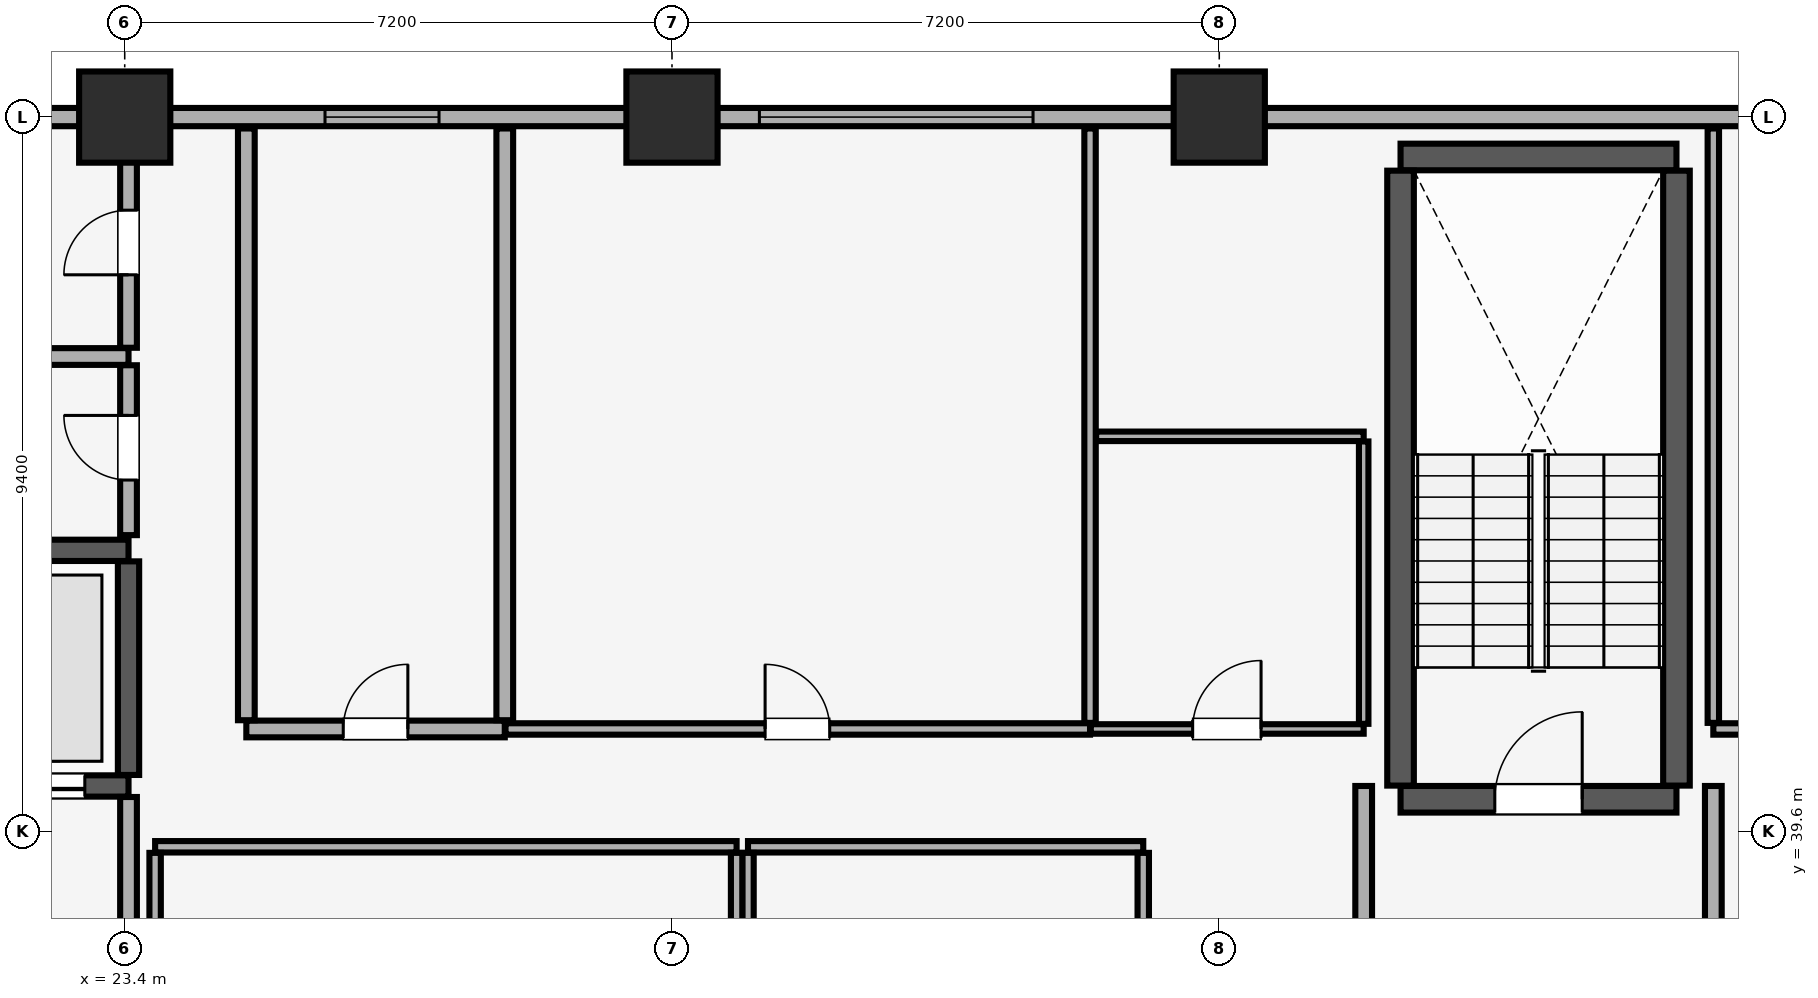
"""IFC4 building model, lengths in metres.
Left out: names, types, materials, properties, quantities, classifications, styles, units other than length and angle.
Written with IfcOpenShell. Run it as: python <this file> out.ifc"""

import sys

from ifc_helpers import new_model, si_unit, direction, frame, frame_2d, origin, origin_2d, place, context, subcontext, project, spatial, rectangle, extrude, element, fill, save


model = new_model("IFC4")
c1 = context("Model", 3, precision=1e-05, world=origin(), true_north=direction((0.0, 1.0)))
c2 = subcontext(c1, "Body", "Model", "MODEL_VIEW")
j1 = project(units=[si_unit("LENGTHUNIT", "METRE"), si_unit("PLANEANGLEUNIT", "RADIAN")], contexts=[c1])
p1 = place(None, origin())
s1 = spatial("IfcSite", under=j1, at=p1, CompositionType="ELEMENT")
p2 = place(p1, origin())
s2 = spatial("IfcBuilding", under=s1, at=p2, CompositionType="ELEMENT")
p3 = place(p2, frame((0.0, 0.0, 180.95)))
s3 = spatial("IfcBuildingStorey", under=s2, at=p3, CompositionType="ELEMENT", Elevation=180.95)
for number, where, z_axis, x_axis in (
    (1, (23.4, 49.0, 0.0), (0.0, 0.0, 1.0), (1.0, 0.0, 0.0)),
    (2, (30.6, 49.0, 0.0), (0.0, 0.0, 1.0), (1.0, 0.0, 0.0)),
    (3, (37.8, 49.0, 0.0), (0.0, 0.0, 1.0), (1.0, 0.0, 0.0)),
):
    element("IfcColumn", number, at=place(p3, frame(where, z_axis=z_axis, x_axis=x_axis)), inside=s3, PredefinedType="COLUMN", context=c2, shape_type="SweptSolid", body=[
        extrude(rectangle(XDim=1.2, YDim=1.2, at=origin_2d()), origin(), (0.0, 0.0, 1.0), 3.45),
    ])
p4 = place(p3, frame((77.0, 49.0, 0.0), z_axis=(0.0, 0.0, 1.0), x_axis=(-1.0, 0.0, 0.0)))
e4 = element("IfcWall", 4, at=p4, inside=s3, PredefinedType="SOLIDWALL", context=c2, shape_type="SweptSolid", body=[
    extrude(rectangle(XDim=70.0, YDim=0.24, at=frame_2d((35.0, 0.0))), origin(), (0.0, 0.0, 1.0), 2.65),
])
p5 = place(p4, frame((63.7, 0.0, 0.85)))
e5 = element("IfcOpeningElement", 5, at=p5, cuts=e4, PredefinedType="OPENING", context=c2, shape_type="SweptSolid", body=[
    extrude(rectangle(XDim=3.0, YDim=1.5, at=frame_2d((1.5, 0.75))), frame((0.0, 0.13, 0.0), z_axis=(0.0, -1.0, 0.0), x_axis=(1.0, 0.0, 0.0)), (0.0, 0.0, 1.0), 0.26),
])
p6 = place(p4, frame((3.3, 0.0, 0.85)))
e6 = element("IfcOpeningElement", 6, at=p6, cuts=e4, PredefinedType="OPENING", context=c2, shape_type="SweptSolid", body=[
    extrude(rectangle(XDim=3.0, YDim=1.5, at=frame_2d((1.5, 0.75))), frame((0.0, 0.13, 0.0), z_axis=(0.0, -1.0, 0.0), x_axis=(1.0, 0.0, 0.0)), (0.0, 0.0, 1.0), 0.26),
])
p7 = place(p4, frame((49.465, 0.0, 0.9)))
e7 = element("IfcOpeningElement", 7, at=p7, cuts=e4, PredefinedType="OPENING", context=c2, shape_type="SweptSolid", body=[
    extrude(rectangle(XDim=1.5, YDim=1.4, at=frame_2d((0.75, 0.7))), frame((0.0, 0.13, 0.0), z_axis=(0.0, -1.0, 0.0), x_axis=(1.0, 0.0, 0.0)), (0.0, 0.0, 1.0), 0.26),
])
p8 = place(p4, frame((41.65, 0.0, 0.9)))
e8 = element("IfcOpeningElement", 8, at=p8, cuts=e4, PredefinedType="OPENING", context=c2, shape_type="SweptSolid", body=[
    extrude(rectangle(XDim=3.6, YDim=1.5, at=frame_2d((1.8, 0.75))), frame((0.0, 0.13, 0.0), z_axis=(0.0, -1.0, 0.0), x_axis=(1.0, 0.0, 0.0)), (0.0, 0.0, 1.0), 0.26),
])
p9 = place(p4, frame((28.25, 0.0, 0.9)))
e9 = element("IfcOpeningElement", 9, at=p9, cuts=e4, PredefinedType="OPENING", context=c2, shape_type="SweptSolid", body=[
    extrude(rectangle(XDim=1.5, YDim=1.4, at=frame_2d((0.75, 0.7))), frame((0.0, 0.13, 0.0), z_axis=(0.0, -1.0, 0.0), x_axis=(1.0, 0.0, 0.0)), (0.0, 0.0, 1.0), 0.26),
])
p10 = place(p4, frame((24.6, 0.0, 0.9)))
e10 = element("IfcOpeningElement", 10, at=p10, cuts=e4, PredefinedType="OPENING", context=c2, shape_type="SweptSolid", body=[
    extrude(rectangle(XDim=2.4, YDim=1.5, at=frame_2d((1.2, 0.75))), frame((0.0, 0.13, 0.0), z_axis=(0.0, -1.0, 0.0), x_axis=(1.0, 0.0, 0.0)), (0.0, 0.0, 1.0), 0.26),
])
p11 = place(p4, frame((20.235, 0.0, 0.9)))
e11 = element("IfcOpeningElement", 11, at=p11, cuts=e4, PredefinedType="OPENING", context=c2, shape_type="SweptSolid", body=[
    extrude(rectangle(XDim=2.4, YDim=1.5, at=frame_2d((1.2, 0.75))), frame((0.0, 0.13, 0.0), z_axis=(0.0, -1.0, 0.0), x_axis=(1.0, 0.0, 0.0)), (0.0, 0.0, 1.0), 0.26),
])
p12 = place(p3, frame((40.185, 40.025, 0.0), z_axis=(0.0, 0.0, 1.0), x_axis=(1.0, 0.0, 0.0)))
e12 = element("IfcWall", 12, at=p12, inside=s3, PredefinedType="SHEAR", context=c2, shape_type="SweptSolid", body=[
    extrude(rectangle(XDim=3.63, YDim=0.35, at=frame_2d((1.815, 0.0))), origin(), (0.0, 0.0, 1.0), 3.45),
])
p13 = place(p12, frame((1.24, 0.0, 0.0)))
e13 = element("IfcOpeningElement", 13, at=p13, cuts=e12, PredefinedType="OPENING", context=c2, shape_type="SweptSolid", body=[
    extrude(rectangle(XDim=1.15, YDim=2.15, at=frame_2d((0.575, 1.075))), frame((0.0, 0.185, 0.0), z_axis=(0.0, -1.0, 0.0), x_axis=(1.0, 0.0, 0.0)), (0.0, 0.0, 1.0), 0.37),
])
p14 = place(p3, frame((40.185, 48.475, 0.0), z_axis=(0.0, 0.0, 1.0), x_axis=(1.0, 0.0, 0.0)))
e14 = element("IfcWall", 14, at=p14, inside=s3, PredefinedType="SHEAR", context=c2, shape_type="SweptSolid", body=[
    extrude(rectangle(XDim=3.63, YDim=0.35, at=frame_2d((1.815, 0.0))), origin(), (0.0, 0.0, 1.0), 3.45),
])
for number, where, z_axis, x_axis in (
    (15, (40.185, 40.205, 0.0), (0.0, 0.0, 1.0), (0.0, 1.0, 0.0)),
    (16, (43.815, 40.205, 0.0), (0.0, 0.0, 1.0), (0.0, 1.0, 0.0)),
):
    element("IfcWall", number, at=place(p3, frame(where, z_axis=z_axis, x_axis=x_axis)), inside=s3, PredefinedType="SHEAR", context=c2, shape_type="SweptSolid", body=[
        extrude(rectangle(XDim=8.09, YDim=0.35, at=frame_2d((4.045, 0.0))), origin(), (0.0, 0.0, 1.0), 3.45),
    ])
p15 = place(p3, frame((21.035, 40.2, 0.0), z_axis=(0.0, 0.0, 1.0), x_axis=(1.0, 0.0, 0.0)))
e17 = element("IfcWall", 17, at=p15, inside=s3, PredefinedType="SHEAR", context=c2, shape_type="SweptSolid", body=[
    extrude(rectangle(XDim=2.415, YDim=0.28, at=frame_2d((1.208, 0.0))), origin(), (0.0, 0.0, 1.0), 3.45),
])
p16 = place(p15, frame((0.54, 0.0, 0.0)))
e18 = element("IfcOpeningElement", 18, at=p16, cuts=e17, PredefinedType="OPENING", context=c2, shape_type="SweptSolid", body=[
    extrude(rectangle(XDim=1.3, YDim=2.3, at=frame_2d((0.65, 1.15))), frame((0.0, 0.15, 0.0), z_axis=(0.0, -1.0, 0.0), x_axis=(1.0, 0.0, 0.0)), (0.0, 0.0, 1.0), 0.3),
])
p17 = place(p3, frame((21.035, 43.3, 0.0), z_axis=(0.0, 0.0, 1.0), x_axis=(1.0, 0.0, 0.0)))
e19 = element("IfcWall", 19, at=p17, inside=s3, PredefinedType="SHEAR", context=c2, shape_type="SweptSolid", body=[
    extrude(rectangle(XDim=2.415, YDim=0.28, at=frame_2d((1.208, 0.0))), origin(), (0.0, 0.0, 1.0), 3.45),
])
p18 = place(p3, frame((23.45, 40.345, 0.0), z_axis=(0.0, 0.0, 1.0), x_axis=(0.0, 1.0, 0.0)))
e20 = element("IfcWall", 20, at=p18, inside=s3, PredefinedType="SHEAR", context=c2, shape_type="SweptSolid", body=[
    extrude(rectangle(XDim=2.81, YDim=0.28, at=frame_2d((1.405, 0.0))), origin(), (0.0, 0.0, 1.0), 3.45),
])
p19 = place(p3, frame((23.45, 34.415, 0.0), z_axis=(0.0, 0.0, 1.0), x_axis=(0.0, 1.0, 0.0)))
e21 = element("IfcWall", 21, at=p19, inside=s3, PredefinedType="PARTITIONING", context=c2, shape_type="SweptSolid", body=[
    extrude(rectangle(XDim=5.64, YDim=0.22, at=frame_2d((2.82, 0.0))), origin(), (0.0, 0.0, 1.0), 3.45),
])
for number, where, z_axis, x_axis in (
    (22, (39.7, 34.415, 0.0), (0.0, 0.0, 1.0), (0.0, 1.0, 0.0)),
    (23, (44.3, 34.415, 0.0), (0.0, 0.0, 1.0), (0.0, 1.0, 0.0)),
):
    element("IfcWall", number, at=place(p3, frame(where, z_axis=z_axis, x_axis=x_axis)), inside=s3, PredefinedType="PARTITIONING", context=c2, shape_type="SweptSolid", body=[
        extrude(rectangle(XDim=5.785, YDim=0.22, at=frame_2d((2.893, 0.0))), origin(), (0.0, 0.0, 1.0), 3.45),
    ])
p20 = place(p3, frame((21.035, 45.85, 0.0), z_axis=(0.0, 0.0, 1.0), x_axis=(1.0, 0.0, 0.0)))
e24 = element("IfcWall", 24, at=p20, inside=s3, PredefinedType="PARTITIONING", context=c2, shape_type="SweptSolid", body=[
    extrude(rectangle(XDim=2.415, YDim=0.22, at=frame_2d((1.208, 0.0))), origin(), (0.0, 0.0, 1.0), 3.45),
])
p21 = place(p3, frame((23.45, 43.5, 0.0), z_axis=(0.0, 0.0, 1.0), x_axis=(0.0, 1.0, 0.0)))
e25 = element("IfcWall", 25, at=p21, inside=s3, PredefinedType="PARTITIONING", context=c2, shape_type="SweptSolid", body=[
    extrude(rectangle(XDim=2.235, YDim=0.22, at=frame_2d((1.118, 0.0))), origin(), (0.0, 0.0, 1.0), 3.45),
])
p22 = place(p21, frame((0.725, 0.0, 0.0)))
e26 = element("IfcOpeningElement", 26, at=p22, cuts=e25, PredefinedType="OPENING", context=c2, shape_type="SweptSolid", body=[
    extrude(rectangle(XDim=0.85, YDim=2.1, at=frame_2d((0.425, 1.05))), frame((0.0, 0.12, 0.0), z_axis=(0.0, -1.0, 0.0), x_axis=(1.0, 0.0, 0.0)), (0.0, 0.0, 1.0), 0.24),
])
p23 = place(p3, frame((23.45, 45.965, 0.0), z_axis=(0.0, 0.0, 1.0), x_axis=(0.0, 1.0, 0.0)))
e27 = element("IfcWall", 27, at=p23, inside=s3, PredefinedType="PARTITIONING", context=c2, shape_type="SweptSolid", body=[
    extrude(rectangle(XDim=2.885, YDim=0.22, at=frame_2d((1.442, 0.0))), origin(), (0.0, 0.0, 1.0), 3.45),
])
p24 = place(p23, frame((0.96, 0.0, 0.0)))
e28 = element("IfcOpeningElement", 28, at=p24, cuts=e27, PredefinedType="OPENING", context=c2, shape_type="SweptSolid", body=[
    extrude(rectangle(XDim=0.85, YDim=2.1, at=frame_2d((0.425, 1.05))), frame((0.0, 0.12, 0.0), z_axis=(0.0, -1.0, 0.0), x_axis=(1.0, 0.0, 0.0)), (0.0, 0.0, 1.0), 0.24),
])
p25 = place(p3, frame((31.6, 39.4, 0.0), z_axis=(0.0, 0.0, 1.0), x_axis=(1.0, 0.0, 0.0)))
e29 = element("IfcWall", 29, at=p25, inside=s3, PredefinedType="PARTITIONING", context=c2, shape_type="SweptSolid", body=[
    extrude(rectangle(XDim=5.2, YDim=0.15, at=frame_2d((2.6, 0.0))), origin(), (0.0, 0.0, 1.0), 3.45),
])
for number, where, z_axis, x_axis in (
    (30, (31.6, 34.38, 0.0), (0.0, 0.0, 1.0), (0.0, 1.0, 0.0)),
    (31, (36.8, 34.38, 0.0), (0.0, 0.0, 1.0), (0.0, 1.0, 0.0)),
):
    element("IfcWall", number, at=place(p3, frame(where, z_axis=z_axis, x_axis=x_axis)), inside=s3, PredefinedType="PARTITIONING", context=c2, shape_type="SweptSolid", body=[
        extrude(rectangle(XDim=4.94, YDim=0.15, at=frame_2d((2.47, 0.0))), origin(), (0.0, 0.0, 1.0), 3.45),
    ])
p26 = place(p3, frame((23.8, 39.4, 0.0), z_axis=(0.0, 0.0, 1.0), x_axis=(1.0, 0.0, 0.0)))
e32 = element("IfcWall", 32, at=p26, inside=s3, PredefinedType="PARTITIONING", context=c2, shape_type="SweptSolid", body=[
    extrude(rectangle(XDim=7.65, YDim=0.15, at=frame_2d((3.825, 0.0))), origin(), (0.0, 0.0, 1.0), 3.45),
])
for number, where, z_axis, x_axis in (
    (33, (23.8, 34.38, 0.0), (0.0, 0.0, 1.0), (0.0, 1.0, 0.0)),
    (34, (31.45, 34.38, 0.0), (0.0, 0.0, 1.0), (0.0, 1.0, 0.0)),
):
    element("IfcWall", number, at=place(p3, frame(where, z_axis=z_axis, x_axis=x_axis)), inside=s3, PredefinedType="PARTITIONING", context=c2, shape_type="SweptSolid", body=[
        extrude(rectangle(XDim=4.94, YDim=0.15, at=frame_2d((2.47, 0.0))), origin(), (0.0, 0.0, 1.0), 3.45),
    ])
p27 = place(p3, frame((25.0, 40.95, 0.0), z_axis=(0.0, 0.0, 1.0), x_axis=(1.0, 0.0, 0.0)))
e35 = element("IfcWall", 35, at=p27, inside=s3, PredefinedType="PARTITIONING", context=c2, shape_type="SweptSolid", body=[
    extrude(rectangle(XDim=3.4, YDim=0.22, at=frame_2d((1.7, 0.0))), origin(), (0.0, 0.0, 1.0), 3.45),
])
p28 = place(p27, frame((1.275, 0.0, 0.0)))
e36 = element("IfcOpeningElement", 36, at=p28, cuts=e35, PredefinedType="OPENING", context=c2, shape_type="SweptSolid", body=[
    extrude(rectangle(XDim=0.85, YDim=2.1, at=frame_2d((0.425, 1.05))), frame((0.0, 0.12, 0.0), z_axis=(0.0, -1.0, 0.0), x_axis=(1.0, 0.0, 0.0)), (0.0, 0.0, 1.0), 0.24),
])
for number, where, z_axis, x_axis in (
    (37, (25.0, 41.065, 0.0), (0.0, 0.0, 1.0), (0.0, 1.0, 0.0)),
    (38, (28.4, 41.065, 0.0), (0.0, 0.0, 1.0), (0.0, 1.0, 0.0)),
):
    element("IfcWall", number, at=place(p3, frame(where, z_axis=z_axis, x_axis=x_axis)), inside=s3, PredefinedType="PARTITIONING", context=c2, shape_type="SweptSolid", body=[
        extrude(rectangle(XDim=7.785, YDim=0.22, at=frame_2d((3.893, 0.0))), origin(), (0.0, 0.0, 1.0), 3.45),
    ])
p29 = place(p3, frame((28.41, 40.95, 0.0), z_axis=(0.0, 0.0, 1.0), x_axis=(1.0, 0.0, 0.0)))
e39 = element("IfcWall", 39, at=p29, inside=s3, PredefinedType="PARTITIONING", context=c2, shape_type="SweptSolid", body=[
    extrude(rectangle(XDim=7.69, YDim=0.15, at=frame_2d((3.845, 0.0))), origin(), (0.0, 0.0, 1.0), 3.45),
])
p30 = place(p29, frame((3.415, 0.0, 0.0)))
e40 = element("IfcOpeningElement", 40, at=p30, cuts=e39, PredefinedType="OPENING", context=c2, shape_type="SweptSolid", body=[
    extrude(rectangle(XDim=0.85, YDim=2.1, at=frame_2d((0.425, 1.05))), frame((0.0, 0.085, 0.0), z_axis=(0.0, -1.0, 0.0), x_axis=(1.0, 0.0, 0.0)), (0.0, 0.0, 1.0), 0.17),
])
p31 = place(p3, frame((36.1, 41.03, 0.0), z_axis=(0.0, 0.0, 1.0), x_axis=(0.0, 1.0, 0.0)))
e41 = element("IfcWall", 41, at=p31, inside=s3, PredefinedType="PARTITIONING", context=c2, shape_type="SweptSolid", body=[
    extrude(rectangle(XDim=7.82, YDim=0.15, at=frame_2d((3.91, 0.0))), origin(), (0.0, 0.0, 1.0), 3.45),
])
p32 = place(p3, frame((36.11, 40.95, 0.0), z_axis=(0.0, 0.0, 1.0), x_axis=(1.0, 0.0, 0.0)))
e42 = element("IfcWall", 42, at=p32, inside=s3, PredefinedType="PARTITIONING", context=c2, shape_type="SweptSolid", body=[
    extrude(rectangle(XDim=3.59, YDim=0.125, at=frame_2d((1.795, 0.0))), origin(), (0.0, 0.0, 1.0), 3.45),
])
p33 = place(p32, frame((1.34, 0.0, 0.0)))
e43 = element("IfcOpeningElement", 43, at=p33, cuts=e42, PredefinedType="OPENING", context=c2, shape_type="SweptSolid", body=[
    extrude(rectangle(XDim=0.9, YDim=2.1, at=frame_2d((0.45, 1.05))), frame((0.0, 0.073, 0.0), z_axis=(0.0, -1.0, 0.0), x_axis=(1.0, 0.0, 0.0)), (0.0, 0.0, 1.0), 0.145),
])
p34 = place(p3, frame((36.18, 44.8, 0.0), z_axis=(0.0, 0.0, 1.0), x_axis=(1.0, 0.0, 0.0)))
e44 = element("IfcWall", 44, at=p34, inside=s3, PredefinedType="PARTITIONING", context=c2, shape_type="SweptSolid", body=[
    extrude(rectangle(XDim=3.52, YDim=0.125, at=frame_2d((1.76, 0.0))), origin(), (0.0, 0.0, 1.0), 3.45),
])
p35 = place(p3, frame((39.7, 41.018, 0.0), z_axis=(0.0, 0.0, 1.0), x_axis=(0.0, 1.0, 0.0)))
e45 = element("IfcWall", 45, at=p35, inside=s3, PredefinedType="PARTITIONING", context=c2, shape_type="SweptSolid", body=[
    extrude(rectangle(XDim=3.715, YDim=0.125, at=frame_2d((1.857, 0.0))), origin(), (0.0, 0.0, 1.0), 3.45),
])
p36 = place(p3, frame((44.3, 40.95, 0.0), z_axis=(0.0, 0.0, 1.0), x_axis=(1.0, 0.0, 0.0)))
e46 = element("IfcWall", 46, at=p36, inside=s3, PredefinedType="PARTITIONING", context=c2, shape_type="SweptSolid", body=[
    extrude(rectangle(XDim=5.1, YDim=0.15, at=frame_2d((2.55, 0.0))), origin(), (0.0, 0.0, 1.0), 3.45),
])
p37 = place(p36, frame((2.875, 0.0, 0.0)))
e47 = element("IfcOpeningElement", 47, at=p37, cuts=e46, PredefinedType="OPENING", context=c2, shape_type="SweptSolid", body=[
    extrude(rectangle(XDim=0.85, YDim=2.1, at=frame_2d((0.425, 1.05))), frame((0.0, 0.085, 0.0), z_axis=(0.0, -1.0, 0.0), x_axis=(1.0, 0.0, 0.0)), (0.0, 0.0, 1.0), 0.17),
])
p38 = place(p3, frame((44.3, 41.03, 0.0), z_axis=(0.0, 0.0, 1.0), x_axis=(0.0, 1.0, 0.0)))
e48 = element("IfcWall", 48, at=p38, inside=s3, PredefinedType="PARTITIONING", context=c2, shape_type="SweptSolid", body=[
    extrude(rectangle(XDim=7.82, YDim=0.15, at=frame_2d((3.91, 0.0))), origin(), (0.0, 0.0, 1.0), 3.45),
])
p39 = place(p7, origin())
e49 = element("IfcWindow", 49, at=p39, inside=s3, PartitioningType="SINGLE_PANEL", PredefinedType="WINDOW", context=c2, shape_type="SweptSolid", body=[
    extrude(rectangle(XDim=1.5, YDim=1.4, at=frame_2d((0.75, 0.7))), frame((0.0, 0.03, 0.0), z_axis=(0.0, -1.0, 0.0), x_axis=(1.0, 0.0, 0.0)), (0.0, 0.0, 1.0), 0.06),
])
fill(e7, e49)
p40 = place(p8, origin())
e50 = element("IfcWindow", 50, at=p40, inside=s3, PartitioningType="SINGLE_PANEL", PredefinedType="WINDOW", context=c2, shape_type="SweptSolid", body=[
    extrude(rectangle(XDim=3.6, YDim=1.5, at=frame_2d((1.8, 0.75))), frame((0.0, 0.03, 0.0), z_axis=(0.0, -1.0, 0.0), x_axis=(1.0, 0.0, 0.0)), (0.0, 0.0, 1.0), 0.06),
])
fill(e8, e50)
p41 = place(p13, origin())
e51 = element("IfcDoor", 51, at=p41, inside=s3, OperationType="SINGLE_SWING_RIGHT", PredefinedType="DOOR", context=c2, shape_type="SweptSolid", body=[
    extrude(rectangle(XDim=1.15, YDim=2.15, at=frame_2d((0.575, 1.075))), frame((0.0, 0.025, 0.0), z_axis=(0.0, -1.0, 0.0), x_axis=(1.0, 0.0, 0.0)), (0.0, 0.0, 1.0), 0.05),
])
fill(e13, e51)
p42 = place(p16, origin())
e52 = element("IfcDoor", 52, at=p42, inside=s3, OperationType="DOUBLE_DOOR_SLIDING", PredefinedType="DOOR", context=c2, shape_type="SweptSolid", body=[
    extrude(rectangle(XDim=1.3, YDim=2.3, at=frame_2d((0.65, 1.15))), frame((0.0, 0.025, 0.0), z_axis=(0.0, -1.0, 0.0), x_axis=(1.0, 0.0, 0.0)), (0.0, 0.0, 1.0), 0.05),
])
fill(e18, e52)
p43 = place(p22, origin())
e53 = element("IfcDoor", 53, at=p43, inside=s3, OperationType="SINGLE_SWING_RIGHT", PredefinedType="DOOR", context=c2, shape_type="SweptSolid", body=[
    extrude(rectangle(XDim=0.85, YDim=2.1, at=frame_2d((0.425, 1.05))), frame((0.0, 0.025, 0.0), z_axis=(0.0, -1.0, 0.0), x_axis=(1.0, 0.0, 0.0)), (0.0, 0.0, 1.0), 0.05),
])
fill(e26, e53)
p44 = place(p24, origin())
e54 = element("IfcDoor", 54, at=p44, inside=s3, OperationType="SINGLE_SWING_LEFT", PredefinedType="DOOR", context=c2, shape_type="SweptSolid", body=[
    extrude(rectangle(XDim=0.85, YDim=2.1, at=frame_2d((0.425, 1.05))), frame((0.0, 0.025, 0.0), z_axis=(0.0, -1.0, 0.0), x_axis=(1.0, 0.0, 0.0)), (0.0, 0.0, 1.0), 0.05),
])
fill(e28, e54)
p45 = place(p28, origin())
e55 = element("IfcDoor", 55, at=p45, inside=s3, OperationType="SINGLE_SWING_RIGHT", PredefinedType="DOOR", context=c2, shape_type="SweptSolid", body=[
    extrude(rectangle(XDim=0.85, YDim=2.1, at=frame_2d((0.425, 1.05))), frame((0.0, 0.025, 0.0), z_axis=(0.0, -1.0, 0.0), x_axis=(1.0, 0.0, 0.0)), (0.0, 0.0, 1.0), 0.05),
])
fill(e36, e55)
p46 = place(p30, origin())
e56 = element("IfcDoor", 56, at=p46, inside=s3, OperationType="SINGLE_SWING_LEFT", PredefinedType="DOOR", context=c2, shape_type="SweptSolid", body=[
    extrude(rectangle(XDim=0.85, YDim=2.1, at=frame_2d((0.425, 1.05))), frame((0.0, 0.025, 0.0), z_axis=(0.0, -1.0, 0.0), x_axis=(1.0, 0.0, 0.0)), (0.0, 0.0, 1.0), 0.05),
])
fill(e40, e56)
p47 = place(p33, origin())
e57 = element("IfcDoor", 57, at=p47, inside=s3, OperationType="SINGLE_SWING_RIGHT", PredefinedType="DOOR", context=c2, shape_type="SweptSolid", body=[
    extrude(rectangle(XDim=0.9, YDim=2.1, at=frame_2d((0.45, 1.05))), frame((0.0, 0.025, 0.0), z_axis=(0.0, -1.0, 0.0), x_axis=(1.0, 0.0, 0.0)), (0.0, 0.0, 1.0), 0.05),
])
fill(e43, e57)
save(model, sys.argv[1])
